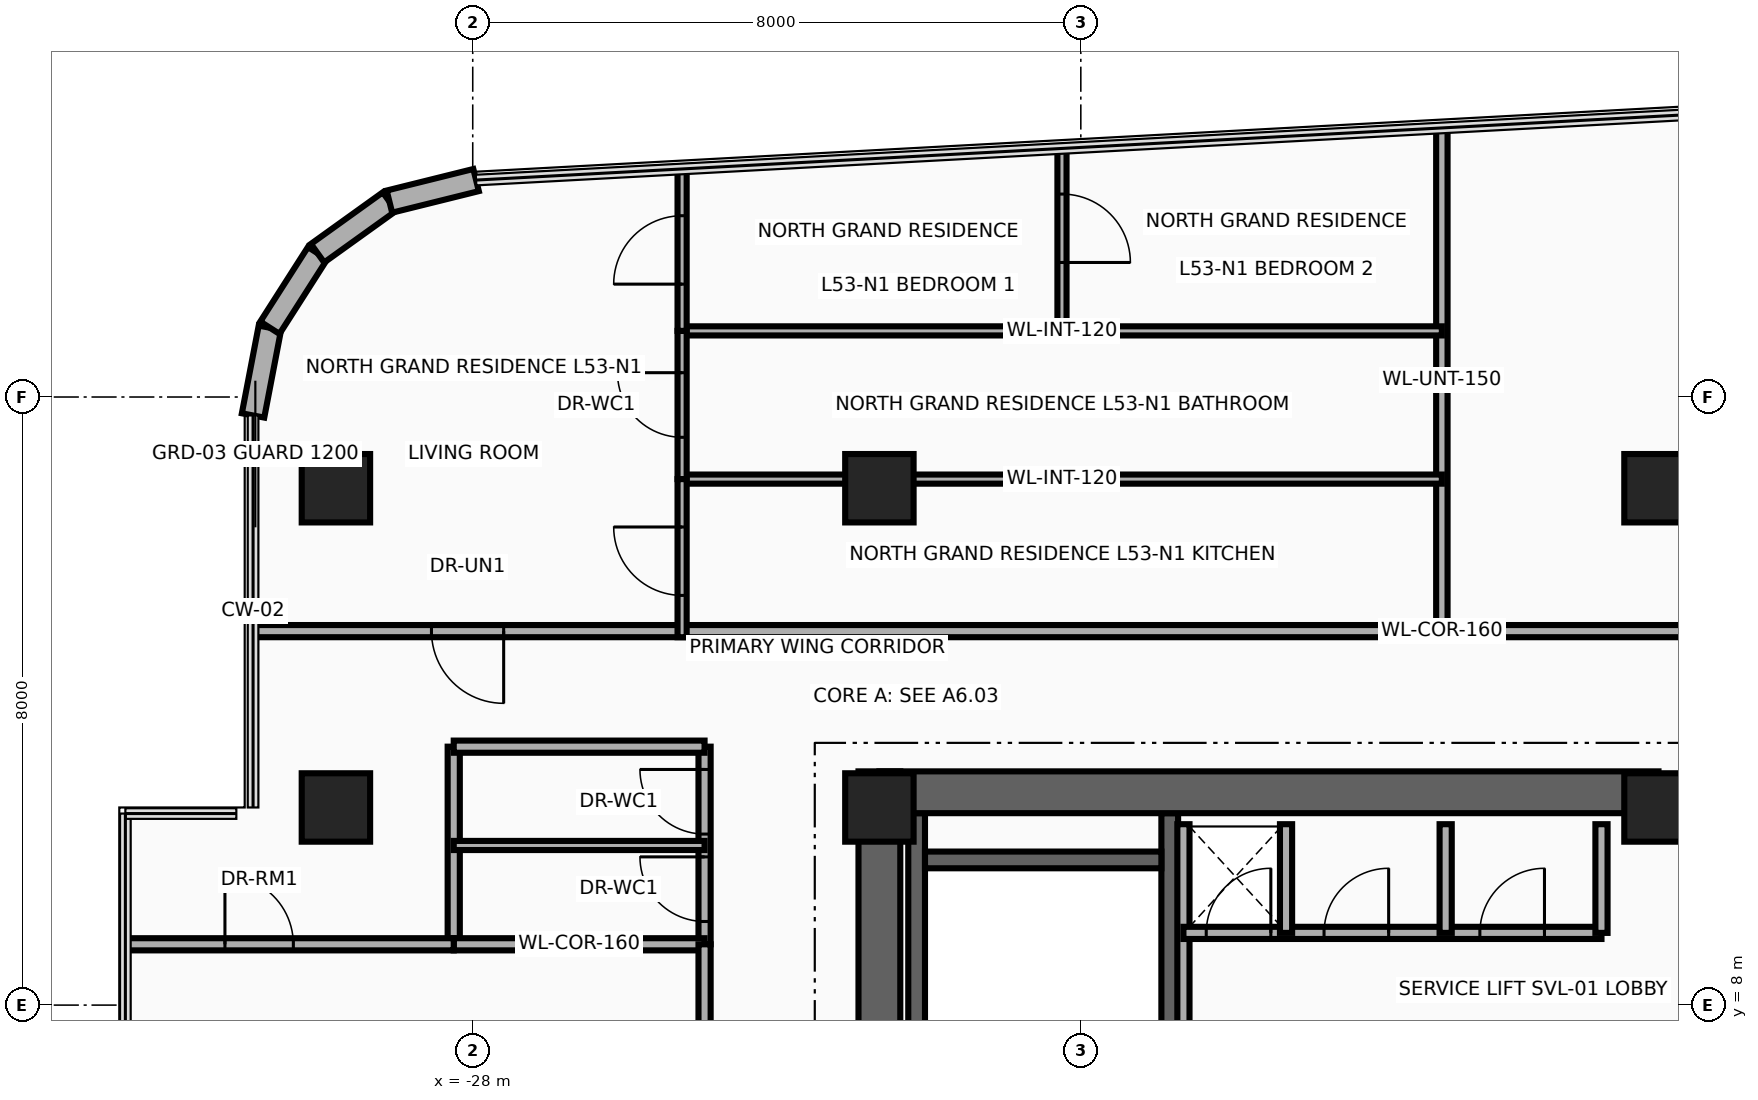
"""IFC4 building model, lengths in metres.
Left out: names, types, materials, properties, quantities, classifications, styles, units other than length and angle.
Written with IfcOpenShell. Run it as: python <this file> out.ifc"""

import sys

from ifc_helpers import new_model, si_unit, direction, frame, frame_2d, origin, origin_2d, place, context, subcontext, project, spatial, rectangle, extrude, source, transform, mapped, element, fill, save


model = new_model("IFC4")
c1 = context("Model", 3, precision=1e-05, world=origin(), true_north=direction((0.0, 1.0)))
c2 = subcontext(c1, "Body", "Model", "MODEL_VIEW")
j1 = project(units=[si_unit("LENGTHUNIT", "METRE"), si_unit("PLANEANGLEUNIT", "RADIAN")], contexts=[c1])
p1 = place(None, origin())
s1 = spatial("IfcSite", under=j1, at=p1, CompositionType="ELEMENT")
p2 = place(p1, origin())
s2 = spatial("IfcBuilding", under=s1, at=p2, CompositionType="ELEMENT")
p3 = place(p2, frame((0.0, 0.0, 209.0)))
s3 = spatial("IfcBuildingStorey", under=s2, at=p3, CompositionType="ELEMENT", Elevation=209.0)
for number, where, z_axis, x_axis in (
    (1, (-22.16, 1.78, 0.0), (0.0, 0.0, 1.0), (0.0, 1.0, 0.0)),
    (2, (-18.83, 1.78, 0.0), (0.0, 0.0, 1.0), (0.0, 1.0, 0.0)),
):
    element("IfcWall", number, at=place(p3, frame(where, z_axis=z_axis, x_axis=x_axis)), inside=s3, PredefinedType="SHEAR", context=c2, shape_type="SweptSolid", body=[
        extrude(rectangle(XDim=8.745, YDim=0.22, at=frame_2d((4.373, 0.0))), origin(), (0.0, 0.0, 1.0), 3.26),
    ])
p4 = place(p3, frame((-22.05, 9.91, 0.0), z_axis=(0.0, 0.0, 1.0), x_axis=(1.0, 0.0, 0.0)))
e3 = element("IfcWall", 3, at=p4, inside=s3, PredefinedType="SHEAR", context=c2, shape_type="SweptSolid", body=[
    extrude(rectangle(XDim=3.11, YDim=0.22, at=frame_2d((1.555, 0.0))), origin(), (0.0, 0.0, 1.0), 3.26),
])
p5 = place(p3, frame((-22.65, -11.075, 0.0), z_axis=(0.0, 0.0, 1.0), x_axis=(0.0, 1.0, 0.0)))
e4 = element("IfcWall", 4, at=p5, inside=s3, PredefinedType="SHEAR", context=c2, shape_type="SweptSolid", body=[
    extrude(rectangle(XDim=22.15, YDim=0.55, at=frame_2d((11.075, 0.0))), origin(), (0.0, 0.0, 1.0), 3.26),
])
p6 = place(p3, frame((-22.65, 10.8, 0.0), z_axis=(0.0, 0.0, 1.0), x_axis=(1.0, 0.0, 0.0)))
e5 = element("IfcWall", 5, at=p6, inside=s3, PredefinedType="SHEAR", context=c2, shape_type="SweptSolid", body=[
    extrude(rectangle(XDim=10.25, YDim=0.55, at=frame_2d((5.125, 0.0))), origin(), (0.0, 0.0, 1.0), 3.26),
])
m1 = source(origin(), c2, "Body", "SweptSolid", [
    extrude(rectangle(XDim=0.9, YDim=0.9, at=origin_2d()), origin(), (0.0, 0.0, 1.0), 3.5),
])
for number, where, z_axis, x_axis in (
    (6, (-29.8, 10.6, 0.0), (0.0, 0.0, 1.0), (1.0, 0.0, 0.0)),
    (7, (-22.65, 10.6, 0.0), (0.0, 0.0, 1.0), (1.0, 0.0, 0.0)),
    (8, (-12.4, 10.6, 0.0), (0.0, 0.0, 1.0), (1.0, 0.0, 0.0)),
    (9, (-29.8, 14.8, 0.0), (0.0, 0.0, 1.0), (1.0, 0.0, 0.0)),
    (10, (-22.65, 14.8, 0.0), (0.0, 0.0, 1.0), (1.0, 0.0, 0.0)),
    (11, (-12.4, 14.8, 0.0), (0.0, 0.0, 1.0), (1.0, 0.0, 0.0)),
):
    element("IfcColumn", number, at=place(p3, frame(where, z_axis=z_axis, x_axis=x_axis)), inside=s3, PredefinedType="COLUMN", context=c2, shape_type="MappedRepresentation", body=[
        mapped(m1, transform((0.0, 0.0, 0.0), x_axis=(1.0, 0.0, 0.0), y_axis=(0.0, 1.0, 0.0), z_axis=(0.0, 0.0, 1.0), scale=1.0)),
    ])
p7 = place(p3, frame((-30.89, 15.758, 0.0), z_axis=(0.0, 0.0, 1.0), x_axis=(0.18831542659, 0.982108598938, 0.0)))
e12 = element("IfcWall", 12, at=p7, inside=s3, PredefinedType="SOLIDWALL", context=c2, shape_type="SweptSolid", body=[
    extrude(rectangle(XDim=1.175, YDim=0.3, at=frame_2d((0.587, 0.0))), origin(), (0.0, 0.0, 1.0), 3.26),
])
p8 = place(p3, frame((-30.669, 16.911, 0.0), z_axis=(0.0, 0.0, 1.0), x_axis=(0.538678781902, 0.84251122837, 0.0)))
e13 = element("IfcWall", 13, at=p8, inside=s3, PredefinedType="SOLIDWALL", context=c2, shape_type="SweptSolid", body=[
    extrude(rectangle(XDim=1.164, YDim=0.3, at=frame_2d((0.582, 0.0))), origin(), (0.0, 0.0, 1.0), 3.26),
])
p9 = place(p3, frame((-30.042, 17.892, 0.0), z_axis=(0.0, 0.0, 1.0), x_axis=(0.812313539683, 0.583220981487, 0.0)))
e14 = element("IfcWall", 14, at=p9, inside=s3, PredefinedType="SOLIDWALL", context=c2, shape_type="SweptSolid", body=[
    extrude(rectangle(XDim=1.164, YDim=0.3, at=frame_2d((0.582, 0.0))), origin(), (0.0, 0.0, 1.0), 3.26),
])
p10 = place(p3, frame((-29.096, 18.571, 0.0), z_axis=(0.0, 0.0, 1.0), x_axis=(0.97050812798, 0.241068400098, 0.0)))
e15 = element("IfcWall", 15, at=p10, inside=s3, PredefinedType="SOLIDWALL", context=c2, shape_type="SweptSolid", body=[
    extrude(rectangle(XDim=1.175, YDim=0.3, at=frame_2d((0.587, 0.0))), origin(), (0.0, 0.0, 1.0), 3.26),
])
p11 = place(p3, frame((-18.65, 7.45, 0.0), z_axis=(0.0, 0.0, 1.0), x_axis=(0.0, 1.0, 0.0)))
e16 = element("IfcWall", 16, at=p11, inside=s3, PredefinedType="PARTITIONING", context=c2, shape_type="SweptSolid", body=[
    extrude(rectangle(XDim=2.93, YDim=0.16, at=frame_2d((1.465, 0.0))), origin(), (0.0, 0.0, 1.0), 3.26),
])
p12 = place(p3, frame((-18.65, 8.95, 0.0), z_axis=(0.0, 0.0, 1.0), x_axis=(1.0, 0.0, 0.0)))
e17 = element("IfcWall", 17, at=p12, inside=s3, PredefinedType="PARTITIONING", context=c2, shape_type="SweptSolid", body=[
    extrude(rectangle(XDim=5.5, YDim=0.16, at=frame_2d((2.75, 0.0))), origin(), (0.0, 0.0, 1.0), 3.26),
])
p13 = place(p12, frame((0.3, 0.0, 0.0)))
e18 = element("IfcOpeningElement", 18, at=p13, cuts=e17, PredefinedType="OPENING", context=c2, shape_type="SweptSolid", body=[
    extrude(rectangle(XDim=0.85, YDim=2.05, at=frame_2d((0.425, 1.025))), frame((0.0, 0.095, 0.0), z_axis=(0.0, -1.0, 0.0), x_axis=(1.0, 0.0, 0.0)), (0.0, 0.0, 1.0), 0.19),
])
p14 = place(p12, frame((1.85, 0.0, 0.0)))
e19 = element("IfcOpeningElement", 19, at=p14, cuts=e17, PredefinedType="OPENING", context=c2, shape_type="SweptSolid", body=[
    extrude(rectangle(XDim=0.85, YDim=2.05, at=frame_2d((0.425, 1.025))), frame((0.0, 0.095, 0.0), z_axis=(0.0, -1.0, 0.0), x_axis=(1.0, 0.0, 0.0)), (0.0, 0.0, 1.0), 0.19),
])
p15 = place(p12, frame((3.9, 0.0, 0.0)))
e20 = element("IfcOpeningElement", 20, at=p15, cuts=e17, PredefinedType="OPENING", context=c2, shape_type="SweptSolid", body=[
    extrude(rectangle(XDim=0.85, YDim=2.05, at=frame_2d((0.425, 1.025))), frame((0.0, 0.095, 0.0), z_axis=(0.0, -1.0, 0.0), x_axis=(1.0, 0.0, 0.0)), (0.0, 0.0, 1.0), 0.19),
])
for number, where, z_axis, x_axis in (
    (21, (-13.15, 8.95, 0.0), (0.0, 0.0, 1.0), (0.0, 1.0, 0.0)),
    (22, (-17.3, 8.95, 0.0), (0.0, 0.0, 1.0), (0.0, 1.0, 0.0)),
    (23, (-15.2, 8.95, 0.0), (0.0, 0.0, 1.0), (0.0, 1.0, 0.0)),
):
    element("IfcWall", number, at=place(p3, frame(where, z_axis=z_axis, x_axis=x_axis)), inside=s3, PredefinedType="PARTITIONING", context=c2, shape_type="SweptSolid", body=[
        extrude(rectangle(XDim=1.43, YDim=0.16, at=frame_2d((0.715, 0.0))), origin(), (0.0, 0.0, 1.0), 3.26),
    ])
p16 = place(p3, frame((-28.25, 8.8, 0.0), z_axis=(0.0, 0.0, 1.0), x_axis=(0.0, 1.0, 0.0)))
e24 = element("IfcWall", 24, at=p16, inside=s3, PredefinedType="PARTITIONING", context=c2, shape_type="SweptSolid", body=[
    extrude(rectangle(XDim=2.6, YDim=0.16, at=frame_2d((1.3, 0.0))), origin(), (0.0, 0.0, 1.0), 2.544),
])
p17 = place(p3, frame((-24.95, 8.8, 0.0), z_axis=(0.0, 0.0, 1.0), x_axis=(0.0, 1.0, 0.0)))
e25 = element("IfcWall", 25, at=p17, inside=s3, PredefinedType="PARTITIONING", context=c2, shape_type="SweptSolid", body=[
    extrude(rectangle(XDim=2.6, YDim=0.16, at=frame_2d((1.3, 0.0))), origin(), (0.0, 0.0, 1.0), 2.544),
])
p18 = place(p17, frame((0.3, 0.0, 0.0)))
e26 = element("IfcOpeningElement", 26, at=p18, cuts=e25, PredefinedType="OPENING", context=c2, shape_type="SweptSolid", body=[
    extrude(rectangle(XDim=0.85, YDim=2.1, at=frame_2d((0.425, 1.05))), frame((0.0, 0.095, 0.0), z_axis=(0.0, -1.0, 0.0), x_axis=(1.0, 0.0, 0.0)), (0.0, 0.0, 1.0), 0.19),
])
p19 = place(p17, frame((1.45, 0.0, 0.0)))
e27 = element("IfcOpeningElement", 27, at=p19, cuts=e25, PredefinedType="OPENING", context=c2, shape_type="SweptSolid", body=[
    extrude(rectangle(XDim=0.85, YDim=2.1, at=frame_2d((0.425, 1.05))), frame((0.0, 0.095, 0.0), z_axis=(0.0, -1.0, 0.0), x_axis=(1.0, 0.0, 0.0)), (0.0, 0.0, 1.0), 0.19),
])
for number, where, z_axis, x_axis in (
    (28, (-28.25, 8.8, 0.0), (0.0, 0.0, 1.0), (1.0, 0.0, 0.0)),
    (29, (-28.25, 11.4, 0.0), (0.0, 0.0, 1.0), (1.0, 0.0, 0.0)),
):
    element("IfcWall", number, at=place(p3, frame(where, z_axis=z_axis, x_axis=x_axis)), inside=s3, PredefinedType="PARTITIONING", context=c2, shape_type="SweptSolid", body=[
        extrude(rectangle(XDim=3.3, YDim=0.16, at=frame_2d((1.65, 0.0))), origin(), (0.0, 0.0, 1.0), 3.26),
    ])
p20 = place(p3, frame((-28.25, 10.1, 0.0), z_axis=(0.0, 0.0, 1.0), x_axis=(1.0, 0.0, 0.0)))
e30 = element("IfcWall", 30, at=p20, inside=s3, PredefinedType="PARTITIONING", context=c2, shape_type="SweptSolid", body=[
    extrude(rectangle(XDim=3.3, YDim=0.12, at=frame_2d((1.65, 0.0))), origin(), (0.0, 0.0, 1.0), 3.26),
])
p21 = place(p3, frame((-24.95, -17.54, 0.0), z_axis=(0.0, 0.0, 1.0), x_axis=(0.0, 1.0, 0.0)))
e31 = element("IfcWall", 31, at=p21, inside=s3, PredefinedType="PARTITIONING", context=c2, shape_type="SweptSolid", body=[
    extrude(rectangle(XDim=26.34, YDim=0.16, at=frame_2d((13.17, 0.0))), origin(), (0.0, 0.0, 1.0), 2.544),
])
p22 = place(p21, frame((4.122, 0.0, 0.0)))
e32 = element("IfcOpeningElement", 32, at=p22, cuts=e31, PredefinedType="OPENING", context=c2, shape_type="SweptSolid", body=[
    extrude(rectangle(XDim=0.95, YDim=2.15, at=frame_2d((0.475, 1.075))), frame((0.0, 0.095, 0.0), z_axis=(0.0, -1.0, 0.0), x_axis=(1.0, 0.0, 0.0)), (0.0, 0.0, 1.0), 0.19),
])
p23 = place(p21, frame((18.383, 0.0, 0.0)))
e33 = element("IfcOpeningElement", 33, at=p23, cuts=e31, PredefinedType="OPENING", context=c2, shape_type="SweptSolid", body=[
    extrude(rectangle(XDim=0.9, YDim=2.1, at=frame_2d((0.45, 1.05))), frame((0.0, 0.095, 0.0), z_axis=(0.0, -1.0, 0.0), x_axis=(1.0, 0.0, 0.0)), (0.0, 0.0, 1.0), 0.19),
])
p24 = place(p21, frame((23.388, 0.0, 0.0)))
e34 = element("IfcOpeningElement", 34, at=p24, cuts=e31, PredefinedType="OPENING", context=c2, shape_type="SweptSolid", body=[
    extrude(rectangle(XDim=0.9, YDim=2.1, at=frame_2d((0.45, 1.05))), frame((0.0, 0.095, 0.0), z_axis=(0.0, -1.0, 0.0), x_axis=(1.0, 0.0, 0.0)), (0.0, 0.0, 1.0), 0.19),
])
p25 = place(p3, frame((-32.54, 8.8, 0.0), z_axis=(0.0, 0.0, 1.0), x_axis=(1.0, 0.0, 0.0)))
e35 = element("IfcWall", 35, at=p25, inside=s3, PredefinedType="PARTITIONING", context=c2, shape_type="SweptSolid", body=[
    extrude(rectangle(XDim=4.29, YDim=0.16, at=frame_2d((2.145, 0.0))), origin(), (0.0, 0.0, 1.0), 2.706),
])
p26 = place(p25, frame((1.28, 0.0, 0.0)))
e36 = element("IfcOpeningElement", 36, at=p26, cuts=e35, PredefinedType="OPENING", context=c2, shape_type="SweptSolid", body=[
    extrude(rectangle(XDim=0.9, YDim=2.1, at=frame_2d((0.45, 1.05))), frame((0.0, 0.095, 0.0), z_axis=(0.0, -1.0, 0.0), x_axis=(1.0, 0.0, 0.0)), (0.0, 0.0, 1.0), 0.19),
])
p27 = place(p3, frame((-30.89, 12.92, 0.0), z_axis=(0.0, 0.0, 1.0), x_axis=(1.0, 0.0, 0.0)))
e37 = element("IfcWall", 37, at=p27, inside=s3, PredefinedType="PARTITIONING", context=c2, shape_type="SweptSolid", body=[
    extrude(rectangle(XDim=31.28, YDim=0.16, at=frame_2d((15.64, 0.0))), origin(), (0.0, 0.0, 1.0), 2.634),
])
p28 = place(p27, frame((2.347, 0.0, 0.0)))
e38 = element("IfcOpeningElement", 38, at=p28, cuts=e37, PredefinedType="OPENING", context=c2, shape_type="SweptSolid", body=[
    extrude(rectangle(XDim=0.95, YDim=2.15, at=frame_2d((0.475, 1.075))), frame((0.0, 0.095, 0.0), z_axis=(0.0, -1.0, 0.0), x_axis=(1.0, 0.0, 0.0)), (0.0, 0.0, 1.0), 0.19),
])
p29 = place(p27, frame((22.56, 0.0, 0.0)))
e39 = element("IfcOpeningElement", 39, at=p29, cuts=e37, PredefinedType="OPENING", context=c2, shape_type="SweptSolid", body=[
    extrude(rectangle(XDim=1.8, YDim=2.15, at=frame_2d((0.9, 1.075))), frame((0.0, 0.095, 0.0), z_axis=(0.0, -1.0, 0.0), x_axis=(1.0, 0.0, 0.0)), (0.0, 0.0, 1.0), 0.19),
])
p30 = place(p3, frame((-15.25, 12.92, 0.0), z_axis=(0.0, 0.0, 1.0), x_axis=(0.0, 1.0, 0.0)))
e40 = element("IfcWall", 40, at=p30, inside=s3, PredefinedType="PARTITIONING", context=c2, shape_type="SweptSolid", body=[
    extrude(rectangle(XDim=6.62, YDim=0.15, at=frame_2d((3.31, 0.0))), origin(), (0.0, 0.0, 1.0), 2.544),
])
p31 = place(p3, frame((-25.246, 14.92, 0.0), z_axis=(0.0, 0.0, 1.0), x_axis=(1.0, 0.0, 0.0)))
e41 = element("IfcWall", 41, at=p31, inside=s3, PredefinedType="PARTITIONING", context=c2, shape_type="SweptSolid", body=[
    extrude(rectangle(XDim=9.996, YDim=0.12, at=frame_2d((4.998, 0.0))), origin(), (0.0, 0.0, 1.0), 2.544),
])
p32 = place(p3, frame((-25.246, 16.87, 0.0), z_axis=(0.0, 0.0, 1.0), x_axis=(1.0, 0.0, 0.0)))
e42 = element("IfcWall", 42, at=p32, inside=s3, PredefinedType="PARTITIONING", context=c2, shape_type="SweptSolid", body=[
    extrude(rectangle(XDim=9.996, YDim=0.12, at=frame_2d((4.998, 0.0))), origin(), (0.0, 0.0, 1.0), 3.26),
])
p33 = place(p3, frame((-25.246, 14.92, 0.0), z_axis=(0.0, 0.0, 1.0), x_axis=(0.0, 1.0, 0.0)))
e43 = element("IfcWall", 43, at=p33, inside=s3, PredefinedType="PARTITIONING", context=c2, shape_type="SweptSolid", body=[
    extrude(rectangle(XDim=1.95, YDim=0.12, at=frame_2d((0.975, 0.0))), origin(), (0.0, 0.0, 1.0), 2.544),
])
p34 = place(p33, frame((0.55, 0.0, 0.0)))
e44 = element("IfcOpeningElement", 44, at=p34, cuts=e43, PredefinedType="OPENING", context=c2, shape_type="SweptSolid", body=[
    extrude(rectangle(XDim=0.85, YDim=2.1, at=frame_2d((0.425, 1.05))), frame((0.0, 0.075, 0.0), z_axis=(0.0, -1.0, 0.0), x_axis=(1.0, 0.0, 0.0)), (0.0, 0.0, 1.0), 0.15),
])
p35 = place(p3, frame((-25.246, 12.84, 0.0), z_axis=(0.0, 0.0, 1.0), x_axis=(0.0, 1.0, 0.0)))
e45 = element("IfcWall", 45, at=p35, inside=s3, PredefinedType="PARTITIONING", context=c2, shape_type="SweptSolid", body=[
    extrude(rectangle(XDim=2.08, YDim=0.12, at=frame_2d((1.04, 0.0))), origin(), (0.0, 0.0, 1.0), 2.544),
])
p36 = place(p35, frame((0.55, 0.0, 0.0)))
e46 = element("IfcOpeningElement", 46, at=p36, cuts=e45, PredefinedType="OPENING", context=c2, shape_type="SweptSolid", body=[
    extrude(rectangle(XDim=0.9, YDim=2.1, at=frame_2d((0.45, 1.05))), frame((0.0, 0.075, 0.0), z_axis=(0.0, -1.0, 0.0), x_axis=(1.0, 0.0, 0.0)), (0.0, 0.0, 1.0), 0.15),
])
p37 = place(p3, frame((-25.246, 16.87, 0.0), z_axis=(0.0, 0.0, 1.0), x_axis=(0.0, 1.0, 0.0)))
e47 = element("IfcWall", 47, at=p37, inside=s3, PredefinedType="PARTITIONING", context=c2, shape_type="SweptSolid", body=[
    extrude(rectangle(XDim=2.13, YDim=0.12, at=frame_2d((1.065, 0.0))), origin(), (0.0, 0.0, 1.0), 3.26),
])
p38 = place(p37, frame((0.615, 0.0, 0.0)))
e48 = element("IfcOpeningElement", 48, at=p38, cuts=e47, PredefinedType="OPENING", context=c2, shape_type="SweptSolid", body=[
    extrude(rectangle(XDim=0.9, YDim=2.1, at=frame_2d((0.45, 1.05))), frame((0.0, 0.075, 0.0), z_axis=(0.0, -1.0, 0.0), x_axis=(1.0, 0.0, 0.0)), (0.0, 0.0, 1.0), 0.15),
])
p39 = place(p3, frame((-20.248, 16.87, 0.0), z_axis=(0.0, 0.0, 1.0), x_axis=(0.0, 1.0, 0.0)))
e49 = element("IfcWall", 49, at=p39, inside=s3, PredefinedType="PARTITIONING", context=c2, shape_type="SweptSolid", body=[
    extrude(rectangle(XDim=2.4, YDim=0.12, at=frame_2d((1.2, 0.0))), origin(), (0.0, 0.0, 1.0), 3.26),
])
p40 = place(p39, frame((0.9, 0.0, 0.0)))
e50 = element("IfcOpeningElement", 50, at=p40, cuts=e49, PredefinedType="OPENING", context=c2, shape_type="SweptSolid", body=[
    extrude(rectangle(XDim=0.9, YDim=2.1, at=frame_2d((0.45, 1.05))), frame((0.0, 0.075, 0.0), z_axis=(0.0, -1.0, 0.0), x_axis=(1.0, 0.0, 0.0)), (0.0, 0.0, 1.0), 0.15),
])
p41 = place(p13, origin())
e51 = element("IfcDoor", 51, at=p41, inside=s3, OperationType="SINGLE_SWING_LEFT", PredefinedType="DOOR", context=c2, shape_type="SweptSolid", body=[
    extrude(rectangle(XDim=0.85, YDim=2.05, at=frame_2d((0.425, 1.025))), frame((0.0, 0.025, 0.0), z_axis=(0.0, -1.0, 0.0), x_axis=(1.0, 0.0, 0.0)), (0.0, 0.0, 1.0), 0.05),
])
fill(e18, e51)
p42 = place(p14, origin())
e52 = element("IfcDoor", 52, at=p42, inside=s3, OperationType="SINGLE_SWING_RIGHT", PredefinedType="DOOR", context=c2, shape_type="SweptSolid", body=[
    extrude(rectangle(XDim=0.85, YDim=2.05, at=frame_2d((0.425, 1.025))), frame((0.0, 0.025, 0.0), z_axis=(0.0, -1.0, 0.0), x_axis=(1.0, 0.0, 0.0)), (0.0, 0.0, 1.0), 0.05),
])
fill(e19, e52)
p43 = place(p15, origin())
e53 = element("IfcDoor", 53, at=p43, inside=s3, OperationType="SINGLE_SWING_LEFT", PredefinedType="DOOR", context=c2, shape_type="SweptSolid", body=[
    extrude(rectangle(XDim=0.85, YDim=2.05, at=frame_2d((0.425, 1.025))), frame((0.0, 0.025, 0.0), z_axis=(0.0, -1.0, 0.0), x_axis=(1.0, 0.0, 0.0)), (0.0, 0.0, 1.0), 0.05),
])
fill(e20, e53)
p44 = place(p18, origin())
e54 = element("IfcDoor", 54, at=p44, inside=s3, OperationType="SINGLE_SWING_RIGHT", PredefinedType="DOOR", context=c2, shape_type="SweptSolid", body=[
    extrude(rectangle(XDim=0.85, YDim=2.1, at=frame_2d((0.425, 1.05))), frame((0.0, 0.025, 0.0), z_axis=(0.0, -1.0, 0.0), x_axis=(1.0, 0.0, 0.0)), (0.0, 0.0, 1.0), 0.05),
])
fill(e26, e54)
p45 = place(p19, origin())
e55 = element("IfcDoor", 55, at=p45, inside=s3, OperationType="SINGLE_SWING_LEFT", PredefinedType="DOOR", context=c2, shape_type="SweptSolid", body=[
    extrude(rectangle(XDim=0.85, YDim=2.1, at=frame_2d((0.425, 1.05))), frame((0.0, 0.025, 0.0), z_axis=(0.0, -1.0, 0.0), x_axis=(1.0, 0.0, 0.0)), (0.0, 0.0, 1.0), 0.05),
])
fill(e27, e55)
p46 = place(p26, origin())
e56 = element("IfcDoor", 56, at=p46, inside=s3, OperationType="SINGLE_SWING_RIGHT", PredefinedType="DOOR", context=c2, shape_type="SweptSolid", body=[
    extrude(rectangle(XDim=0.9, YDim=2.1, at=frame_2d((0.45, 1.05))), frame((0.0, 0.025, 0.0), z_axis=(0.0, -1.0, 0.0), x_axis=(1.0, 0.0, 0.0)), (0.0, 0.0, 1.0), 0.05),
])
fill(e36, e56)
p47 = place(p28, frame((0.95, 0.0, 0.0), z_axis=(0.0, 0.0, 1.0), x_axis=(-1.0, 0.0, 0.0)))
e57 = element("IfcDoor", 57, at=p47, inside=s3, OperationType="SINGLE_SWING_LEFT", PredefinedType="DOOR", context=c2, shape_type="SweptSolid", body=[
    extrude(rectangle(XDim=0.95, YDim=2.15, at=frame_2d((0.475, 1.075))), frame((0.0, 0.025, 0.0), z_axis=(0.0, -1.0, 0.0), x_axis=(1.0, 0.0, 0.0)), (0.0, 0.0, 1.0), 0.05),
])
fill(e38, e57)
p48 = place(p34, origin())
e58 = element("IfcDoor", 58, at=p48, inside=s3, OperationType="SINGLE_SWING_RIGHT", PredefinedType="DOOR", context=c2, shape_type="SweptSolid", body=[
    extrude(rectangle(XDim=0.85, YDim=2.1, at=frame_2d((0.425, 1.05))), frame((0.0, 0.025, 0.0), z_axis=(0.0, -1.0, 0.0), x_axis=(1.0, 0.0, 0.0)), (0.0, 0.0, 1.0), 0.05),
])
fill(e44, e58)
p49 = place(p36, origin())
e59 = element("IfcDoor", 59, at=p49, inside=s3, OperationType="SINGLE_SWING_LEFT", PredefinedType="DOOR", context=c2, shape_type="SweptSolid", body=[
    extrude(rectangle(XDim=0.9, YDim=2.1, at=frame_2d((0.45, 1.05))), frame((0.0, 0.025, 0.0), z_axis=(0.0, -1.0, 0.0), x_axis=(1.0, 0.0, 0.0)), (0.0, 0.0, 1.0), 0.05),
])
fill(e46, e59)
p50 = place(p38, origin())
e60 = element("IfcDoor", 60, at=p50, inside=s3, OperationType="SINGLE_SWING_RIGHT", PredefinedType="DOOR", context=c2, shape_type="SweptSolid", body=[
    extrude(rectangle(XDim=0.9, YDim=2.1, at=frame_2d((0.45, 1.05))), frame((0.0, 0.025, 0.0), z_axis=(0.0, -1.0, 0.0), x_axis=(1.0, 0.0, 0.0)), (0.0, 0.0, 1.0), 0.05),
])
fill(e48, e60)
p51 = place(p40, frame((0.9, 0.0, 0.0), z_axis=(0.0, 0.0, 1.0), x_axis=(-1.0, 0.0, 0.0)))
e61 = element("IfcDoor", 61, at=p51, inside=s3, OperationType="SINGLE_SWING_LEFT", PredefinedType="DOOR", context=c2, shape_type="SweptSolid", body=[
    extrude(rectangle(XDim=0.9, YDim=2.1, at=frame_2d((0.45, 1.05))), frame((0.0, 0.025, 0.0), z_axis=(0.0, -1.0, 0.0), x_axis=(1.0, 0.0, 0.0)), (0.0, 0.0, 1.0), 0.05),
])
fill(e50, e61)
save(model, sys.argv[1])
